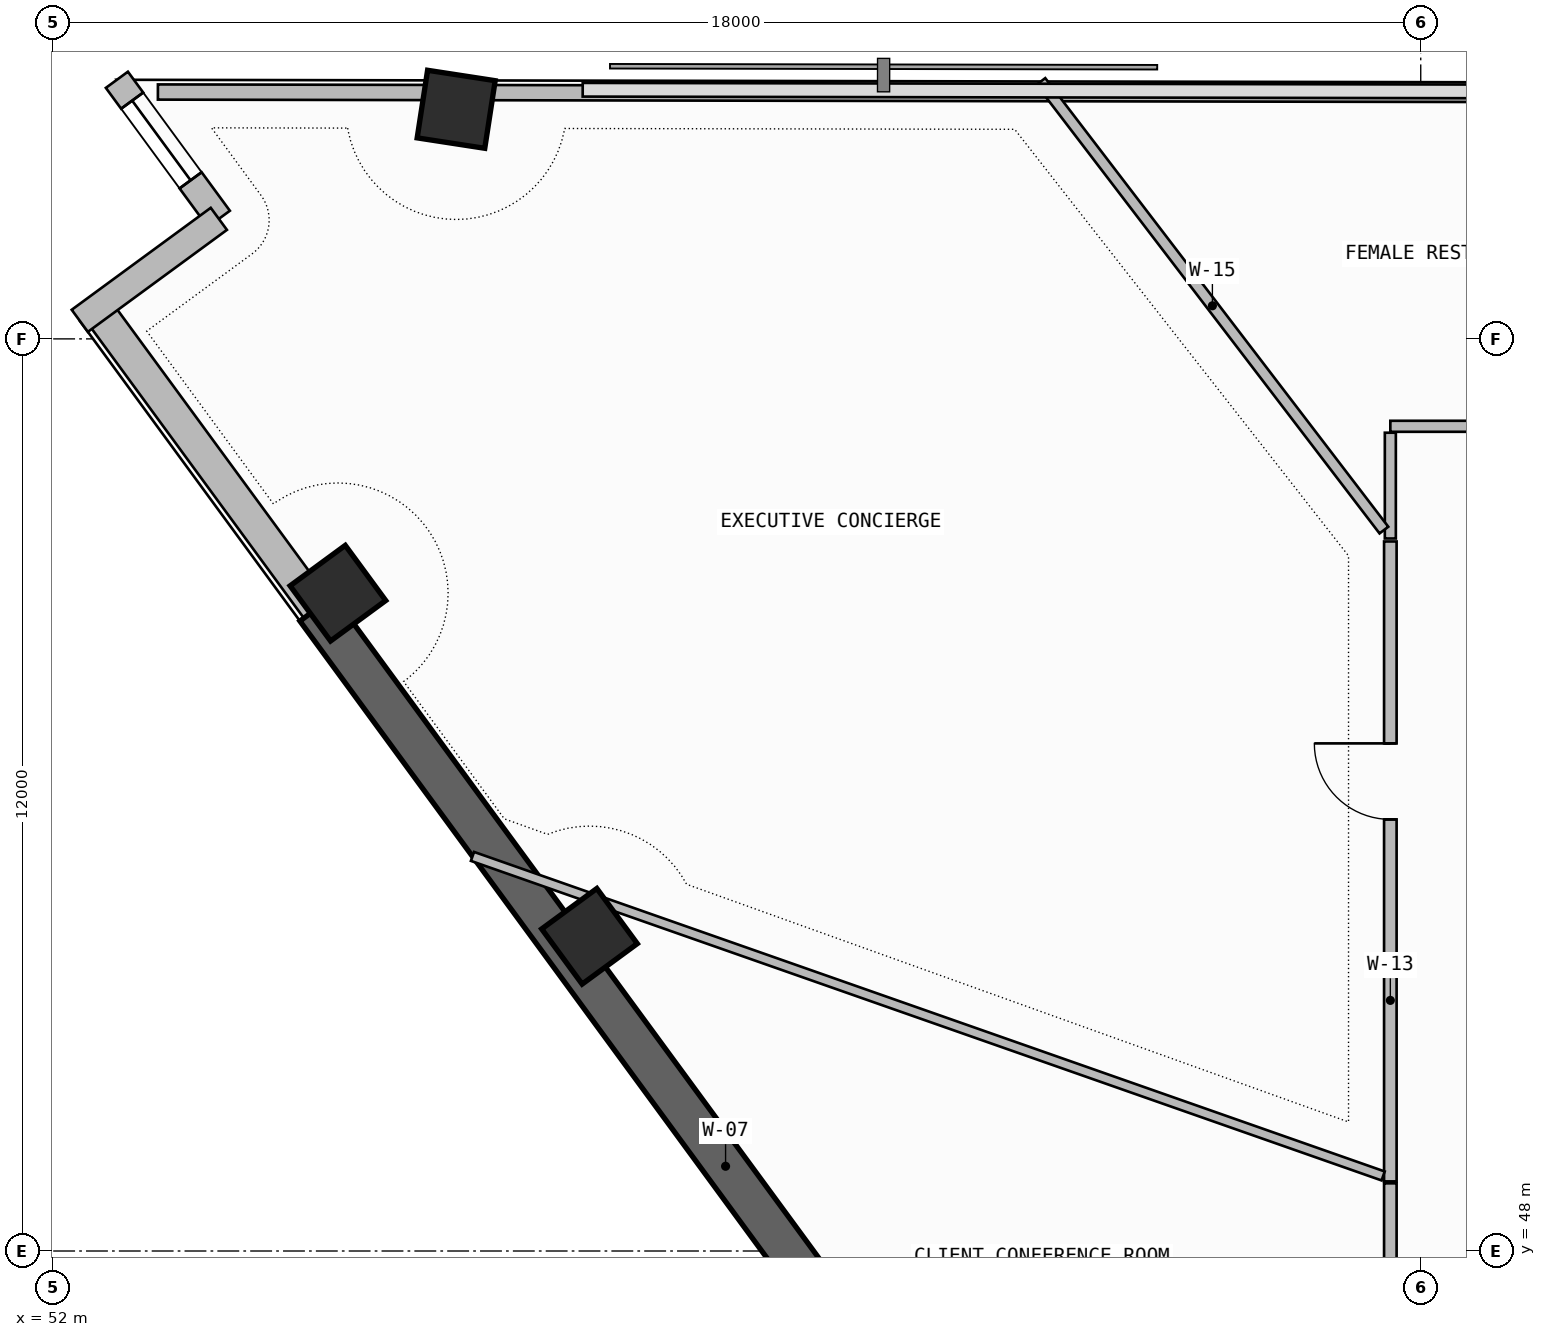
"""IFC4 building model, lengths in metres.
Left out: names, types, materials, properties, quantities, classifications, styles, units other than length and angle.
Written with IfcOpenShell. Run it as: python <this file> out.ifc"""

import sys

from ifc_helpers import new_model, si_unit, direction, frame, frame_2d, origin, origin_2d, place, context, subcontext, project, spatial, rectangle, extrude, element, fill, save


model = new_model("IFC4")
c1 = context("Model", 3, precision=1e-05, world=origin(), true_north=direction((0.0, 1.0)))
c2 = subcontext(c1, "Body", "Model", "MODEL_VIEW")
j1 = project(units=[si_unit("LENGTHUNIT", "METRE"), si_unit("PLANEANGLEUNIT", "RADIAN")], contexts=[c1])
p1 = place(None, origin())
s1 = spatial("IfcSite", under=j1, at=p1, CompositionType="ELEMENT")
p2 = place(p1, origin())
s2 = spatial("IfcBuilding", under=s1, at=p2, CompositionType="ELEMENT")
p3 = place(p2, frame((0.0, 0.0, 232.58)))
s3 = spatial("IfcBuildingStorey", under=s2, at=p3, CompositionType="ELEMENT", Elevation=232.58)
for number, where, z_axis, x_axis in (
    (1, (57.309, 63.021, -0.26), (0.0, 0.0, 1.0), (0.152, 0.988, 0.0)),
    (2, (55.753, 56.654, -0.26), (0.0, 0.0, 1.0), (-0.591, 0.806, 0.0)),
    (3, (59.063, 52.14, -0.26), (0.0, 0.0, 1.0), (-0.591, 0.806, 0.0)),
):
    element("IfcColumn", number, at=place(p3, frame(where, z_axis=z_axis, x_axis=x_axis)), inside=s3, PredefinedType="COLUMN", context=c2, shape_type="SweptSolid", body=[
        extrude(rectangle(XDim=0.9, YDim=0.9, at=origin_2d()), origin(), (0.0, 0.0, 1.0), 3.78),
    ])
p4 = place(p3, frame((52.579, 60.4, 0.0), z_axis=(0.0, 0.0, 1.0), x_axis=(0.591311800505, -0.806443026248, 0.0)))
e4 = element("IfcWall", 4, at=p4, inside=s3, PredefinedType="SOLIDWALL", context=c2, shape_type="SweptSolid", body=[
    extrude(rectangle(XDim=4.898, YDim=0.42, at=frame_2d((2.449, 0.0))), origin(), (0.0, 0.0, 1.0), 2.645),
])
p5 = place(p3, frame((55.475, 56.45, -0.26), z_axis=(0.0, 0.0, 1.0), x_axis=(0.591309555876, -0.806444672082, 0.0)))
e5 = element("IfcWall", 5, at=p5, inside=s3, PredefinedType="SHEAR", context=c2, shape_type="SweptSolid", body=[
    extrude(rectangle(XDim=18.192, YDim=0.55, at=frame_2d((9.096, 0.0))), origin(), (0.0, 0.0, 1.0), 3.52),
])
p6 = place(p3, frame((52.845, 63.409, 0.0), z_axis=(0.0, 0.0, 1.0), x_axis=(0.591251685745, -0.806487101015, 0.0)))
e6 = element("IfcWall", 6, at=p6, inside=s3, PredefinedType="SOLIDWALL", context=c2, shape_type="SweptSolid", body=[
    extrude(rectangle(XDim=2.269, YDim=0.36, at=frame_2d((1.134, 0.0))), origin(), (0.0, 0.0, 1.0), 3.26),
])
p7 = place(p6, frame((0.34, 0.0, 0.45)))
e7 = element("IfcOpeningElement", 7, at=p7, cuts=e6, PredefinedType="OPENING", context=c2, shape_type="SweptSolid", body=[
    extrude(rectangle(XDim=1.3, YDim=2.4, at=frame_2d((0.65, 1.2))), frame((0.0, 0.19, 0.0), z_axis=(0.0, -1.0, 0.0), x_axis=(1.0, 0.0, 0.0)), (0.0, 0.0, 1.0), 0.38),
])
p8 = place(p3, frame((54.187, 61.579, 0.0), z_axis=(0.0, 0.0, 1.0), x_axis=(-0.806449475274, -0.591303005092, 0.0)))
e8 = element("IfcWall", 8, at=p8, inside=s3, PredefinedType="SOLIDWALL", context=c2, shape_type="SweptSolid", body=[
    extrude(rectangle(XDim=2.268, YDim=0.36, at=frame_2d((1.134, 0.0))), origin(), (0.0, 0.0, 1.0), 3.26),
])
p9 = place(p3, frame((83.332, 63.193, 0.0), z_axis=(0.0, 0.0, 1.0), x_axis=(-0.999998363757, 0.001809000383, 0.0)))
e9 = element("IfcWall", 9, at=p9, inside=s3, PredefinedType="PARAPET", context=c2, shape_type="SweptSolid", body=[
    extrude(rectangle(XDim=25.777, YDim=0.2, at=frame_2d((12.889, 0.0))), origin(), (0.0, 0.0, 1.0), 1.15),
])
p10 = place(p3, frame((57.064, 63.241, 0.0), z_axis=(0.0, 0.0, 1.0), x_axis=(-0.999998274159, 0.001857869529, 0.0)))
e10 = element("IfcWall", 10, at=p10, inside=s3, PredefinedType="PARAPET", context=c2, shape_type="SweptSolid", body=[
    extrude(rectangle(XDim=3.679, YDim=0.2, at=frame_2d((1.84, 0.0))), origin(), (0.0, 0.0, 1.0), 1.15),
])
p11 = place(p3, frame((77.35, 58.85, 0.0), z_axis=(0.0, 0.0, 1.0), x_axis=(-1.0, 0.0, 0.0)))
e11 = element("IfcWall", 11, at=p11, inside=s3, PredefinedType="PARTITIONING", context=c2, shape_type="SweptSolid", body=[
    extrude(rectangle(XDim=7.75, YDim=0.145, at=frame_2d((3.875, 0.0))), origin(), (0.0, 0.0, 1.0), 3.26),
])
p12 = place(p11, frame((1.619, 0.0, 0.0)))
e12 = element("IfcOpeningElement", 12, at=p12, cuts=e11, PredefinedType="OPENING", context=c2, shape_type="SweptSolid", body=[
    extrude(rectangle(XDim=0.9, YDim=2.1, at=frame_2d((0.45, 1.05))), frame((0.0, 0.083, 0.0), z_axis=(0.0, -1.0, 0.0), x_axis=(1.0, 0.0, 0.0)), (0.0, 0.0, 1.0), 0.165),
])
p13 = place(p3, frame((69.6, 58.765, 0.0), z_axis=(0.0, 0.0, 1.0), x_axis=(0.0, -1.0, 0.0)))
e13 = element("IfcWall", 13, at=p13, inside=s3, PredefinedType="PARTITIONING", context=c2, shape_type="SweptSolid", body=[
    extrude(rectangle(XDim=1.392, YDim=0.145, at=frame_2d((0.696, 0.0))), origin(), (0.0, 0.0, 1.0), 2.745),
])
p14 = place(p3, frame((69.515, 57.484, 0.0), z_axis=(0.0, 0.0, 1.0), x_axis=(-0.607418396682, 0.794382081477, 0.0)))
e14 = element("IfcWall", 14, at=p14, inside=s3, PredefinedType="PARTITIONING", context=c2, shape_type="SweptSolid", body=[
    extrude(rectangle(XDim=7.43, YDim=0.145, at=frame_2d((3.715, 0.0))), origin(), (0.0, 0.0, 1.0), 2.745),
])
p15 = place(p3, frame((69.6, 57.335, 0.0), z_axis=(0.0, 0.0, 1.0), x_axis=(0.0, -1.0, 0.0)))
e15 = element("IfcWall", 15, at=p15, inside=s3, PredefinedType="PARTITIONING", context=c2, shape_type="SweptSolid", body=[
    extrude(rectangle(XDim=8.419, YDim=0.165, at=frame_2d((4.209, 0.0))), origin(), (0.0, 0.0, 1.0), 2.745),
])
p16 = place(p15, frame((2.656, 0.0, 0.0)))
e16 = element("IfcOpeningElement", 16, at=p16, cuts=e15, PredefinedType="OPENING", context=c2, shape_type="SweptSolid", body=[
    extrude(rectangle(XDim=1.0, YDim=2.2, at=frame_2d((0.5, 1.1))), frame((0.0, 0.093, 0.0), z_axis=(0.0, -1.0, 0.0), x_axis=(1.0, 0.0, 0.0)), (0.0, 0.0, 1.0), 0.185),
])
p17 = place(p3, frame((69.506, 48.987, 0.0), z_axis=(0.0, 0.0, 1.0), x_axis=(-0.943602089714, 0.331081706363, 0.0)))
e17 = element("IfcWall", 17, at=p17, inside=s3, PredefinedType="PARTITIONING", context=c2, shape_type="SweptSolid", body=[
    extrude(rectangle(XDim=12.698, YDim=0.125, at=frame_2d((6.349, 0.0))), origin(), (0.0, 0.0, 1.0), 2.645),
])
p18 = place(p3, frame((69.6, 48.89, 0.0), z_axis=(0.0, 0.0, 1.0), x_axis=(0.0, -1.0, 0.0)))
e18 = element("IfcWall", 18, at=p18, inside=s3, PredefinedType="PARTITIONING", context=c2, shape_type="SweptSolid", body=[
    extrude(rectangle(XDim=5.309, YDim=0.165, at=frame_2d((2.655, 0.0))), origin(), (0.0, 0.0, 1.0), 3.26),
])
p19 = place(p18, frame((2.155, 0.0, 0.0)))
e19 = element("IfcOpeningElement", 19, at=p19, cuts=e18, PredefinedType="OPENING", context=c2, shape_type="SweptSolid", body=[
    extrude(rectangle(XDim=1.0, YDim=2.2, at=frame_2d((0.5, 1.1))), frame((0.0, 0.093, 0.0), z_axis=(0.0, -1.0, 0.0), x_axis=(1.0, 0.0, 0.0)), (0.0, 0.0, 1.0), 0.185),
])
p20 = place(p7, origin())
e20 = element("IfcWindow", 20, at=p20, inside=s3, PartitioningType="SINGLE_PANEL", PredefinedType="WINDOW", context=c2, shape_type="SweptSolid", body=[
    extrude(rectangle(XDim=1.3, YDim=2.4, at=frame_2d((0.65, 1.2))), frame((0.0, 0.03, 0.0), z_axis=(0.0, -1.0, 0.0), x_axis=(1.0, 0.0, 0.0)), (0.0, 0.0, 1.0), 0.06),
])
fill(e7, e20)
p21 = place(p16, frame((1.0, 0.0, 0.0), z_axis=(0.0, 0.0, 1.0), x_axis=(-1.0, 0.0, 0.0)))
e21 = element("IfcDoor", 21, at=p21, inside=s3, OperationType="SINGLE_SWING_RIGHT", PredefinedType="DOOR", context=c2, shape_type="SweptSolid", body=[
    extrude(rectangle(XDim=1.0, YDim=2.2, at=frame_2d((0.5, 1.1))), frame((0.0, 0.025, 0.0), z_axis=(0.0, -1.0, 0.0), x_axis=(1.0, 0.0, 0.0)), (0.0, 0.0, 1.0), 0.05),
])
fill(e16, e21)
save(model, sys.argv[1])
